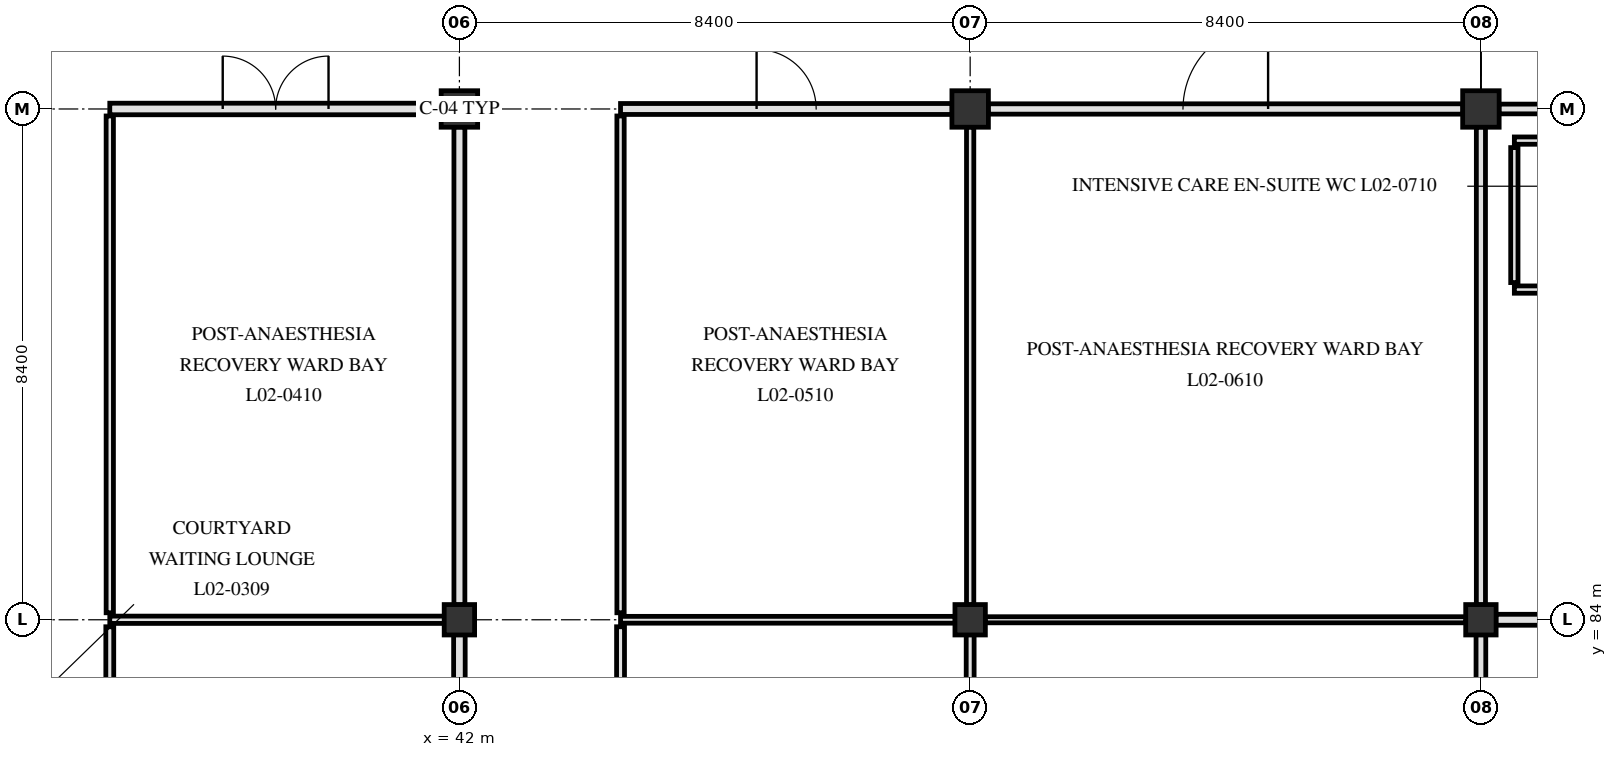
"""IFC4 building model, lengths in metres.
Left out: names, types, materials, properties, quantities, classifications, styles, units other than length and angle.
Written with IfcOpenShell. Run it as: python <this file> out.ifc"""

import sys

from ifc_helpers import new_model, si_unit, direction, frame, frame_2d, origin, origin_2d, place, context, subcontext, project, spatial, rectangle, extrude, element, fill, save


model = new_model("IFC4")
c1 = context("Model", 3, precision=1e-05, world=origin(), true_north=direction((0.0, 1.0)))
c2 = subcontext(c1, "Body", "Model", "MODEL_VIEW")
j1 = project(units=[si_unit("LENGTHUNIT", "METRE"), si_unit("PLANEANGLEUNIT", "RADIAN")], contexts=[c1])
p1 = place(None, origin())
s1 = spatial("IfcSite", under=j1, at=p1, CompositionType="ELEMENT")
p2 = place(p1, origin())
s2 = spatial("IfcBuilding", under=s1, at=p2, CompositionType="ELEMENT")
p3 = place(p2, frame((0.0, 0.0, 9.3)))
s3 = spatial("IfcBuildingStorey", under=s2, at=p3, CompositionType="ELEMENT", Elevation=9.3)
p4 = place(p3, frame((42.0, 84.0, 0.0), z_axis=(0.0, 0.0, 1.0), x_axis=(1.0, 0.0, 0.0)))
e1 = element("IfcColumn", 1, at=p4, inside=s3, PredefinedType="COLUMN", context=c2, shape_type="SweptSolid", body=[
    extrude(rectangle(XDim=0.5, YDim=0.5, at=origin_2d()), origin(), (0.0, 0.0, 1.0), 5.1),
])
p5 = place(p3, frame((42.0, 92.4, 0.0), z_axis=(0.0, 0.0, 1.0), x_axis=(1.0, 0.0, 0.0)))
e2 = element("IfcColumn", 2, at=p5, inside=s3, PredefinedType="COLUMN", context=c2, shape_type="SweptSolid", body=[
    extrude(rectangle(XDim=0.6, YDim=0.6, at=origin_2d()), origin(), (0.0, 0.0, 1.0), 5.1),
])
p6 = place(p3, frame((50.4, 84.0, 0.0), z_axis=(0.0, 0.0, 1.0), x_axis=(1.0, 0.0, 0.0)))
e3 = element("IfcColumn", 3, at=p6, inside=s3, PredefinedType="COLUMN", context=c2, shape_type="SweptSolid", body=[
    extrude(rectangle(XDim=0.5, YDim=0.5, at=origin_2d()), origin(), (0.0, 0.0, 1.0), 5.1),
])
p7 = place(p3, frame((50.4, 92.4, 0.0), z_axis=(0.0, 0.0, 1.0), x_axis=(1.0, 0.0, 0.0)))
e4 = element("IfcColumn", 4, at=p7, inside=s3, PredefinedType="COLUMN", context=c2, shape_type="SweptSolid", body=[
    extrude(rectangle(XDim=0.6, YDim=0.6, at=origin_2d()), origin(), (0.0, 0.0, 1.0), 5.1),
])
p8 = place(p3, frame((58.8, 84.0, 0.0), z_axis=(0.0, 0.0, 1.0), x_axis=(1.0, 0.0, 0.0)))
e5 = element("IfcColumn", 5, at=p8, inside=s3, PredefinedType="COLUMN", context=c2, shape_type="SweptSolid", body=[
    extrude(rectangle(XDim=0.5, YDim=0.5, at=origin_2d()), origin(), (0.0, 0.0, 1.0), 5.1),
])
p9 = place(p3, frame((58.8, 92.4, 0.0), z_axis=(0.0, 0.0, 1.0), x_axis=(1.0, 0.0, 0.0)))
e6 = element("IfcColumn", 6, at=p9, inside=s3, PredefinedType="COLUMN", context=c2, shape_type="SweptSolid", body=[
    extrude(rectangle(XDim=0.6, YDim=0.6, at=origin_2d()), origin(), (0.0, 0.0, 1.0), 5.1),
])
p10 = place(p3, frame((36.25, 84.0, 0.0), z_axis=(0.0, 0.0, 1.0), x_axis=(1.0, 0.0, 0.0)))
e7 = element("IfcWall", 7, at=p10, inside=s3, PredefinedType="PARTITIONING", context=c2, shape_type="SweptSolid", body=[
    extrude(rectangle(XDim=5.505, YDim=0.12, at=frame_2d((2.752, 0.0))), origin(), (0.0, 0.0, 1.0), 4.02),
])
p11 = place(p3, frame((44.65, 84.0, 0.0), z_axis=(0.0, 0.0, 1.0), x_axis=(1.0, 0.0, 0.0)))
e8 = element("IfcWall", 8, at=p11, inside=s3, PredefinedType="PARTITIONING", context=c2, shape_type="SweptSolid", body=[
    extrude(rectangle(XDim=5.505, YDim=0.112, at=frame_2d((2.752, 0.0))), origin(), (0.0, 0.0, 1.0), 4.02),
])
p12 = place(p3, frame((50.645, 84.0, 0.0), z_axis=(0.0, 0.0, 1.0), x_axis=(1.0, 0.0, 0.0)))
e9 = element("IfcWall", 9, at=p12, inside=s3, PredefinedType="PARTITIONING", context=c2, shape_type="SweptSolid", body=[
    extrude(rectangle(XDim=7.91, YDim=0.1, at=frame_2d((3.955, 0.0))), origin(), (0.0, 0.0, 1.0), 4.02),
])
p13 = place(p3, frame((59.045, 84.0, 0.0), z_axis=(0.0, 0.0, 1.0), x_axis=(1.0, 0.0, 0.0)))
e10 = element("IfcWall", 10, at=p13, inside=s3, PredefinedType="PARTITIONING", context=c2, shape_type="SweptSolid", body=[
    extrude(rectangle(XDim=7.91, YDim=0.18, at=frame_2d((3.955, 0.0))), origin(), (0.0, 0.0, 1.0), 4.17),
])
p14 = place(p3, frame((59.35, 89.43, 0.0), z_axis=(0.0, 0.0, 1.0), x_axis=(1.0, 0.0, 0.0)))
e11 = element("IfcWall", 11, at=p14, inside=s3, PredefinedType="PARTITIONING", context=c2, shape_type="SweptSolid", body=[
    extrude(rectangle(XDim=2.9, YDim=0.12, at=frame_2d((1.45, 0.0))), origin(), (0.0, 0.0, 1.0), 4.77),
])
p15 = place(p14, frame((0.975, 0.0, 0.0)))
e12 = element("IfcOpeningElement", 12, at=p15, cuts=e11, PredefinedType="OPENING", context=c2, shape_type="SweptSolid", body=[
    extrude(rectangle(XDim=0.95, YDim=2.1, at=frame_2d((0.475, 1.05))), frame((0.0, 0.07, 0.0), z_axis=(0.0, -1.0, 0.0), x_axis=(1.0, 0.0, 0.0)), (0.0, 0.0, 1.0), 0.14),
])
p16 = place(p3, frame((59.35, 91.88, 0.0), z_axis=(0.0, 0.0, 1.0), x_axis=(1.0, 0.0, 0.0)))
e13 = element("IfcWall", 13, at=p16, inside=s3, PredefinedType="PARTITIONING", context=c2, shape_type="SweptSolid", body=[
    extrude(rectangle(XDim=2.9, YDim=0.12, at=frame_2d((1.45, 0.0))), origin(), (0.0, 0.0, 1.0), 4.77),
])
p17 = place(p3, frame((36.25, 92.4, 0.0), z_axis=(0.0, 0.0, 1.0), x_axis=(1.0, 0.0, 0.0)))
e14 = element("IfcWall", 14, at=p17, inside=s3, PredefinedType="PARTITIONING", context=c2, shape_type="SweptSolid", body=[
    extrude(rectangle(XDim=5.455, YDim=0.19, at=frame_2d((2.728, 0.0))), origin(), (0.0, 0.0, 1.0), 4.02),
])
p18 = place(p17, frame((1.857, 0.0, 0.0)))
e15 = element("IfcOpeningElement", 15, at=p18, cuts=e14, PredefinedType="OPENING", context=c2, shape_type="SweptSolid", body=[
    extrude(rectangle(XDim=1.74, YDim=2.24, at=frame_2d((0.87, 1.12))), frame((0.0, 0.105, 0.0), z_axis=(0.0, -1.0, 0.0), x_axis=(1.0, 0.0, 0.0)), (0.0, 0.0, 1.0), 0.21),
])
p19 = place(p3, frame((44.65, 92.4, 0.0), z_axis=(0.0, 0.0, 1.0), x_axis=(1.0, 0.0, 0.0)))
e16 = element("IfcWall", 16, at=p19, inside=s3, PredefinedType="PARTITIONING", context=c2, shape_type="SweptSolid", body=[
    extrude(rectangle(XDim=5.455, YDim=0.18, at=frame_2d((2.728, 0.0))), origin(), (0.0, 0.0, 1.0), 4.02),
])
p20 = place(p19, frame((2.238, 0.0, 0.0)))
e17 = element("IfcOpeningElement", 17, at=p20, cuts=e16, PredefinedType="OPENING", context=c2, shape_type="SweptSolid", body=[
    extrude(rectangle(XDim=0.98, YDim=2.12, at=frame_2d((0.49, 1.06))), frame((0.0, 0.1, 0.0), z_axis=(0.0, -1.0, 0.0), x_axis=(1.0, 0.0, 0.0)), (0.0, 0.0, 1.0), 0.2),
])
p21 = place(p3, frame((50.695, 92.4, 0.0), z_axis=(0.0, 0.0, 1.0), x_axis=(1.0, 0.0, 0.0)))
e18 = element("IfcWall", 18, at=p21, inside=s3, PredefinedType="PARTITIONING", context=c2, shape_type="SweptSolid", body=[
    extrude(rectangle(XDim=7.81, YDim=0.17, at=frame_2d((3.905, 0.0))), origin(), (0.0, 0.0, 1.0), 4.02),
])
p22 = place(p21, frame((3.205, 0.0, 0.0)))
e19 = element("IfcOpeningElement", 19, at=p22, cuts=e18, PredefinedType="OPENING", context=c2, shape_type="SweptSolid", body=[
    extrude(rectangle(XDim=1.4, YDim=2.2, at=frame_2d((0.7, 1.1))), frame((0.0, 0.095, 0.0), z_axis=(0.0, -1.0, 0.0), x_axis=(1.0, 0.0, 0.0)), (0.0, 0.0, 1.0), 0.19),
])
p23 = place(p3, frame((59.095, 92.4, 0.0), z_axis=(0.0, 0.0, 1.0), x_axis=(1.0, 0.0, 0.0)))
e20 = element("IfcWall", 20, at=p23, inside=s3, PredefinedType="PARTITIONING", context=c2, shape_type="SweptSolid", body=[
    extrude(rectangle(XDim=7.76, YDim=0.16, at=frame_2d((3.88, 0.0))), origin(), (0.0, 0.0, 1.0), 4.17),
])
p24 = place(p23, frame((4.058, 0.0, 0.0)))
e21 = element("IfcOpeningElement", 21, at=p24, cuts=e20, PredefinedType="OPENING", context=c2, shape_type="SweptSolid", body=[
    extrude(rectangle(XDim=1.9, YDim=2.3, at=frame_2d((0.95, 1.15))), frame((0.0, 0.09, 0.0), z_axis=(0.0, -1.0, 0.0), x_axis=(1.0, 0.0, 0.0)), (0.0, 0.0, 1.0), 0.18),
])
p25 = place(p3, frame((36.25, 78.315, 0.0), z_axis=(0.0, 0.0, 1.0), x_axis=(0.0, 1.0, 0.0)))
e22 = element("IfcWall", 22, at=p25, inside=s3, PredefinedType="PARTITIONING", context=c2, shape_type="SweptSolid", body=[
    extrude(rectangle(XDim=5.57, YDim=0.13, at=frame_2d((2.785, 0.0))), origin(), (0.0, 0.0, 1.0), 4.02),
])
p26 = place(p3, frame((36.25, 84.115, 0.0), z_axis=(0.0, 0.0, 1.0), x_axis=(0.0, 1.0, 0.0)))
e23 = element("IfcWall", 23, at=p26, inside=s3, PredefinedType="PARTITIONING", context=c2, shape_type="SweptSolid", body=[
    extrude(rectangle(XDim=8.17, YDim=0.12, at=frame_2d((4.085, 0.0))), origin(), (0.0, 0.0, 1.0), 4.02),
])
p27 = place(p3, frame((42.0, 78.315, 0.0), z_axis=(0.0, 0.0, 1.0), x_axis=(0.0, 1.0, 0.0)))
e24 = element("IfcWall", 24, at=p27, inside=s3, PredefinedType="PARTITIONING", context=c2, shape_type="SweptSolid", body=[
    extrude(rectangle(XDim=5.44, YDim=0.19, at=frame_2d((2.72, 0.0))), origin(), (0.0, 0.0, 1.0), 4.17),
])
p28 = place(p3, frame((42.0, 84.245, 0.0), z_axis=(0.0, 0.0, 1.0), x_axis=(0.0, 1.0, 0.0)))
e25 = element("IfcWall", 25, at=p28, inside=s3, PredefinedType="PARTITIONING", context=c2, shape_type="SweptSolid", body=[
    extrude(rectangle(XDim=7.86, YDim=0.18, at=frame_2d((3.93, 0.0))), origin(), (0.0, 0.0, 1.0), 4.17),
])
p29 = place(p3, frame((44.65, 78.315, 0.0), z_axis=(0.0, 0.0, 1.0), x_axis=(0.0, 1.0, 0.0)))
e26 = element("IfcWall", 26, at=p29, inside=s3, PredefinedType="PARTITIONING", context=c2, shape_type="SweptSolid", body=[
    extrude(rectangle(XDim=5.57, YDim=0.13, at=frame_2d((2.785, 0.0))), origin(), (0.0, 0.0, 1.0), 4.02),
])
p30 = place(p3, frame((44.65, 84.115, 0.0), z_axis=(0.0, 0.0, 1.0), x_axis=(0.0, 1.0, 0.0)))
e27 = element("IfcWall", 27, at=p30, inside=s3, PredefinedType="PARTITIONING", context=c2, shape_type="SweptSolid", body=[
    extrude(rectangle(XDim=8.17, YDim=0.12, at=frame_2d((4.085, 0.0))), origin(), (0.0, 0.0, 1.0), 4.02),
])
p31 = place(p3, frame((50.4, 78.315, 0.0), z_axis=(0.0, 0.0, 1.0), x_axis=(0.0, 1.0, 0.0)))
e28 = element("IfcWall", 28, at=p31, inside=s3, PredefinedType="PARTITIONING", context=c2, shape_type="SweptSolid", body=[
    extrude(rectangle(XDim=5.44, YDim=0.13, at=frame_2d((2.72, 0.0))), origin(), (0.0, 0.0, 1.0), 4.17),
])
p32 = place(p3, frame((50.4, 84.245, 0.0), z_axis=(0.0, 0.0, 1.0), x_axis=(0.0, 1.0, 0.0)))
e29 = element("IfcWall", 29, at=p32, inside=s3, PredefinedType="PARTITIONING", context=c2, shape_type="SweptSolid", body=[
    extrude(rectangle(XDim=7.86, YDim=0.12, at=frame_2d((3.93, 0.0))), origin(), (0.0, 0.0, 1.0), 4.17),
])
p33 = place(p3, frame((58.8, 78.315, 0.0), z_axis=(0.0, 0.0, 1.0), x_axis=(0.0, 1.0, 0.0)))
e30 = element("IfcWall", 30, at=p33, inside=s3, PredefinedType="PARTITIONING", context=c2, shape_type="SweptSolid", body=[
    extrude(rectangle(XDim=5.44, YDim=0.16, at=frame_2d((2.72, 0.0))), origin(), (0.0, 0.0, 1.0), 4.17),
])
p34 = place(p3, frame((58.8, 84.245, 0.0), z_axis=(0.0, 0.0, 1.0), x_axis=(0.0, 1.0, 0.0)))
e31 = element("IfcWall", 31, at=p34, inside=s3, PredefinedType="PARTITIONING", context=c2, shape_type="SweptSolid", body=[
    extrude(rectangle(XDim=7.86, YDim=0.15, at=frame_2d((3.93, 0.0))), origin(), (0.0, 0.0, 1.0), 4.17),
])
p35 = place(p3, frame((59.35, 89.545, 0.0), z_axis=(0.0, 0.0, 1.0), x_axis=(0.0, 1.0, 0.0)))
e32 = element("IfcWall", 32, at=p35, inside=s3, PredefinedType="PARTITIONING", context=c2, shape_type="SweptSolid", body=[
    extrude(rectangle(XDim=2.22, YDim=0.12, at=frame_2d((1.11, 0.0))), origin(), (0.0, 0.0, 1.0), 4.77),
])
p36 = place(p18, origin())
e33 = element("IfcDoor", 33, at=p36, inside=s3, OperationType="DOUBLE_SWING_RIGHT", PredefinedType="DOOR", context=c2, shape_type="SweptSolid", body=[
    extrude(rectangle(XDim=1.74, YDim=2.24, at=frame_2d((0.87, 1.12))), frame((0.0, 0.025, 0.0), z_axis=(0.0, -1.0, 0.0), x_axis=(1.0, 0.0, 0.0)), (0.0, 0.0, 1.0), 0.05),
])
fill(e15, e33)
p37 = place(p20, origin())
e34 = element("IfcDoor", 34, at=p37, inside=s3, OperationType="SINGLE_SWING_LEFT", PredefinedType="DOOR", context=c2, shape_type="SweptSolid", body=[
    extrude(rectangle(XDim=0.98, YDim=2.12, at=frame_2d((0.49, 1.06))), frame((0.0, 0.025, 0.0), z_axis=(0.0, -1.0, 0.0), x_axis=(1.0, 0.0, 0.0)), (0.0, 0.0, 1.0), 0.05),
])
fill(e17, e34)
p38 = place(p22, origin())
e35 = element("IfcDoor", 35, at=p38, inside=s3, OperationType="SINGLE_SWING_RIGHT", PredefinedType="DOOR", context=c2, shape_type="SweptSolid", body=[
    extrude(rectangle(XDim=1.4, YDim=2.2, at=frame_2d((0.7, 1.1))), frame((0.0, 0.025, 0.0), z_axis=(0.0, -1.0, 0.0), x_axis=(1.0, 0.0, 0.0)), (0.0, 0.0, 1.0), 0.05),
])
fill(e19, e35)
save(model, sys.argv[1])
